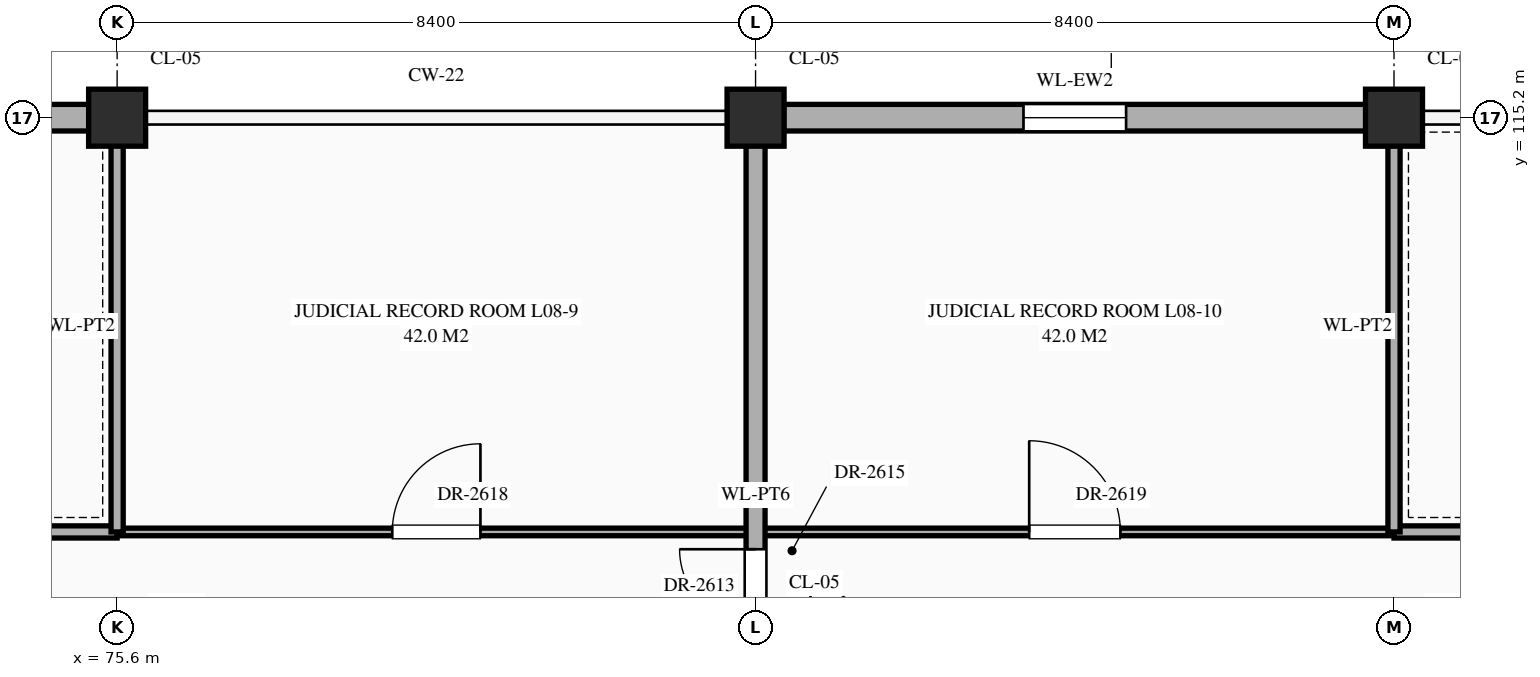
"""IFC4 building model, lengths in metres.
Left out: names, types, materials, properties, quantities, classifications, styles, units other than length and angle.
Written with IfcOpenShell. Run it as: python <this file> out.ifc"""

import sys

from ifc_helpers import new_model, si_unit, direction, frame, frame_2d, origin, origin_2d, place, context, subcontext, project, spatial, rectangle, extrude, element, fill, save


model = new_model("IFC4")
c1 = context("Model", 3, precision=1e-05, world=origin(), true_north=direction((0.0, 1.0)))
c2 = subcontext(c1, "Body", "Model", "MODEL_VIEW")
j1 = project(units=[si_unit("LENGTHUNIT", "METRE"), si_unit("PLANEANGLEUNIT", "RADIAN")], contexts=[c1])
p1 = place(None, origin())
s1 = spatial("IfcSite", under=j1, at=p1, CompositionType="ELEMENT")
p2 = place(p1, origin())
s2 = spatial("IfcBuilding", under=s1, at=p2, CompositionType="ELEMENT")
p3 = place(p2, frame((0.0, 0.0, 35.1)))
s3 = spatial("IfcBuildingStorey", under=s2, at=p3, CompositionType="ELEMENT", Elevation=35.1)
for number, where, z_axis, x_axis in (
    (1, (75.6, 115.2, 0.0), (0.0, 0.0, 1.0), (1.0, 0.0, 0.0)),
    (2, (84.0, 115.2, 0.0), (0.0, 0.0, 1.0), (1.0, 0.0, 0.0)),
    (3, (92.4, 115.2, 0.0), (0.0, 0.0, 1.0), (1.0, 0.0, 0.0)),
):
    element("IfcColumn", number, at=place(p3, frame(where, z_axis=z_axis, x_axis=x_axis)), inside=s3, PredefinedType="COLUMN", context=c2, shape_type="SweptSolid", body=[
        extrude(rectangle(XDim=0.75, YDim=0.75, at=origin_2d()), origin(), (0.0, 0.0, 1.0), 4.2),
    ])
p4 = place(p3, frame((67.57, 115.2, 0.0), z_axis=(0.0, 0.0, 1.0), x_axis=(1.0, 0.0, 0.0)))
e4 = element("IfcWall", 4, at=p4, inside=s3, PredefinedType="STANDARD", context=c2, shape_type="SweptSolid", body=[
    extrude(rectangle(XDim=7.66, YDim=0.35, at=frame_2d((3.83, 0.0))), origin(), (0.0, 0.0, 1.0), 3.3),
])
p5 = place(p4, frame((3.155, 0.0, 0.85)))
e5 = element("IfcOpeningElement", 5, at=p5, cuts=e4, PredefinedType="OPENING", context=c2, shape_type="SweptSolid", body=[
    extrude(rectangle(XDim=1.35, YDim=1.38, at=frame_2d((0.675, 0.69))), frame((0.0, 0.187, 0.0), z_axis=(0.0, -1.0, 0.0), x_axis=(1.0, 0.0, 0.0)), (0.0, 0.0, 1.0), 0.374),
])
p6 = place(p3, frame((84.37, 115.2, 0.0), z_axis=(0.0, 0.0, 1.0), x_axis=(1.0, 0.0, 0.0)))
e6 = element("IfcWall", 6, at=p6, inside=s3, PredefinedType="STANDARD", context=c2, shape_type="SweptSolid", body=[
    extrude(rectangle(XDim=7.66, YDim=0.35, at=frame_2d((3.83, 0.0))), origin(), (0.0, 0.0, 1.0), 3.3),
])
p7 = place(p6, frame((3.155, 0.0, 0.85)))
e7 = element("IfcOpeningElement", 7, at=p7, cuts=e6, PredefinedType="OPENING", context=c2, shape_type="SweptSolid", body=[
    extrude(rectangle(XDim=1.35, YDim=1.74, at=frame_2d((0.675, 0.87))), frame((0.0, 0.187, 0.0), z_axis=(0.0, -1.0, 0.0), x_axis=(1.0, 0.0, 0.0)), (0.0, 0.0, 1.0), 0.374),
])
p8 = place(p3, frame((58.8, 109.75, 0.0), z_axis=(0.0, 0.0, 1.0), x_axis=(1.0, 0.0, 0.0)))
e8 = element("IfcWall", 8, at=p8, inside=s3, PredefinedType="STANDARD", context=c2, shape_type="SweptSolid", body=[
    extrude(rectangle(XDim=16.8, YDim=0.16, at=frame_2d((8.4, 0.0))), origin(), (0.0, 0.0, 1.0), 3.95),
])
p9 = place(p8, frame((7.55, 0.0, 0.0)))
e9 = element("IfcOpeningElement", 9, at=p9, cuts=e8, PredefinedType="OPENING", context=c2, shape_type="SweptSolid", body=[
    extrude(rectangle(XDim=1.7, YDim=2.45, at=frame_2d((0.85, 1.225))), frame((0.0, 0.092, 0.0), z_axis=(0.0, -1.0, 0.0), x_axis=(1.0, 0.0, 0.0)), (0.0, 0.0, 1.0), 0.184),
])
p10 = place(p3, frame((75.6, 109.75, 0.0), z_axis=(0.0, 0.0, 1.0), x_axis=(1.0, 0.0, 0.0)))
e10 = element("IfcWall", 10, at=p10, inside=s3, PredefinedType="STANDARD", context=c2, shape_type="SweptSolid", body=[
    extrude(rectangle(XDim=16.8, YDim=0.1, at=frame_2d((8.4, 0.0))), origin(), (0.0, 0.0, 1.0), 3.95),
])
p11 = place(p10, frame((3.62, 0.0, 0.0)))
e11 = element("IfcOpeningElement", 11, at=p11, cuts=e10, PredefinedType="OPENING", context=c2, shape_type="SweptSolid", body=[
    extrude(rectangle(XDim=1.16, YDim=2.3, at=frame_2d((0.58, 1.15))), frame((0.0, 0.062, 0.0), z_axis=(0.0, -1.0, 0.0), x_axis=(1.0, 0.0, 0.0)), (0.0, 0.0, 1.0), 0.124),
])
p12 = place(p10, frame((12.0, 0.0, 0.0)))
e12 = element("IfcOpeningElement", 12, at=p12, cuts=e10, PredefinedType="OPENING", context=c2, shape_type="SweptSolid", body=[
    extrude(rectangle(XDim=1.2, YDim=2.35, at=frame_2d((0.6, 1.175))), frame((0.0, 0.062, 0.0), z_axis=(0.0, -1.0, 0.0), x_axis=(1.0, 0.0, 0.0)), (0.0, 0.0, 1.0), 0.124),
])
p13 = place(p3, frame((92.4, 109.75, 0.0), z_axis=(0.0, 0.0, 1.0), x_axis=(1.0, 0.0, 0.0)))
e13 = element("IfcWall", 13, at=p13, inside=s3, PredefinedType="STANDARD", context=c2, shape_type="SweptSolid", body=[
    extrude(rectangle(XDim=16.8, YDim=0.16, at=frame_2d((8.4, 0.0))), origin(), (0.0, 0.0, 1.0), 3.95),
])
p14 = place(p13, frame((7.5, 0.0, 0.0)))
e14 = element("IfcOpeningElement", 14, at=p14, cuts=e13, PredefinedType="OPENING", context=c2, shape_type="SweptSolid", body=[
    extrude(rectangle(XDim=1.8, YDim=2.5, at=frame_2d((0.9, 1.25))), frame((0.0, 0.092, 0.0), z_axis=(0.0, -1.0, 0.0), x_axis=(1.0, 0.0, 0.0)), (0.0, 0.0, 1.0), 0.184),
])
p15 = place(p3, frame((75.6, 109.75, 0.0), z_axis=(0.0, 0.0, 1.0), x_axis=(0.0, 1.0, 0.0)))
e15 = element("IfcWall", 15, at=p15, inside=s3, PredefinedType="STANDARD", context=c2, shape_type="SweptSolid", body=[
    extrude(rectangle(XDim=5.41, YDim=0.16, at=frame_2d((2.705, 0.0))), origin(), (0.0, 0.0, 1.0), 3.2),
])
p16 = place(p3, frame((84.0, 84.65, 0.0), z_axis=(0.0, 0.0, 1.0), x_axis=(0.0, 1.0, 0.0)))
e16 = element("IfcWall", 16, at=p16, inside=s3, PredefinedType="STANDARD", context=c2, shape_type="SweptSolid", body=[
    extrude(rectangle(XDim=30.51, YDim=0.25, at=frame_2d((15.255, 0.0))), origin(), (0.0, 0.0, 1.0), 3.2),
])
p17 = place(p16, frame((17.097, 0.0, 0.0)))
e17 = element("IfcOpeningElement", 17, at=p17, cuts=e16, PredefinedType="OPENING", context=c2, shape_type="SweptSolid", body=[
    extrude(rectangle(XDim=2.0, YDim=2.4, at=frame_2d((1.0, 1.2))), frame((0.0, 0.137, 0.0), z_axis=(0.0, -1.0, 0.0), x_axis=(1.0, 0.0, 0.0)), (0.0, 0.0, 1.0), 0.274),
])
p18 = place(p16, frame((7.127, 0.0, 0.0)))
e18 = element("IfcOpeningElement", 18, at=p18, cuts=e16, PredefinedType="OPENING", context=c2, shape_type="SweptSolid", body=[
    extrude(rectangle(XDim=0.95, YDim=2.15, at=frame_2d((0.475, 1.075))), frame((0.0, 0.137, 0.0), z_axis=(0.0, -1.0, 0.0), x_axis=(1.0, 0.0, 0.0)), (0.0, 0.0, 1.0), 0.274),
])
p19 = place(p16, frame((9.823, 0.0, 0.0)))
e19 = element("IfcOpeningElement", 19, at=p19, cuts=e16, PredefinedType="OPENING", context=c2, shape_type="SweptSolid", body=[
    extrude(rectangle(XDim=0.95, YDim=2.15, at=frame_2d((0.475, 1.075))), frame((0.0, 0.137, 0.0), z_axis=(0.0, -1.0, 0.0), x_axis=(1.0, 0.0, 0.0)), (0.0, 0.0, 1.0), 0.274),
])
p20 = place(p16, frame((20.603, 0.0, 0.0)))
e20 = element("IfcOpeningElement", 20, at=p20, cuts=e16, PredefinedType="OPENING", context=c2, shape_type="SweptSolid", body=[
    extrude(rectangle(XDim=1.6, YDim=2.3, at=frame_2d((0.8, 1.15))), frame((0.0, 0.137, 0.0), z_axis=(0.0, -1.0, 0.0), x_axis=(1.0, 0.0, 0.0)), (0.0, 0.0, 1.0), 0.274),
])
p21 = place(p16, frame((23.873, 0.0, 0.0)))
e21 = element("IfcOpeningElement", 21, at=p21, cuts=e16, PredefinedType="OPENING", context=c2, shape_type="SweptSolid", body=[
    extrude(rectangle(XDim=1.0, YDim=2.2, at=frame_2d((0.5, 1.1))), frame((0.0, 0.137, 0.0), z_axis=(0.0, -1.0, 0.0), x_axis=(1.0, 0.0, 0.0)), (0.0, 0.0, 1.0), 0.274),
])
p22 = place(p16, frame((0.228, 0.0, 0.0)))
e22 = element("IfcOpeningElement", 22, at=p22, cuts=e16, PredefinedType="OPENING", context=c2, shape_type="SweptSolid", body=[
    extrude(rectangle(XDim=1.0, YDim=2.2, at=frame_2d((0.5, 1.1))), frame((0.0, 0.137, 0.0), z_axis=(0.0, -1.0, 0.0), x_axis=(1.0, 0.0, 0.0)), (0.0, 0.0, 1.0), 0.274),
])
p23 = place(p3, frame((92.4, 109.75, 0.0), z_axis=(0.0, 0.0, 1.0), x_axis=(0.0, 1.0, 0.0)))
e23 = element("IfcWall", 23, at=p23, inside=s3, PredefinedType="STANDARD", context=c2, shape_type="SweptSolid", body=[
    extrude(rectangle(XDim=5.41, YDim=0.16, at=frame_2d((2.705, 0.0))), origin(), (0.0, 0.0, 1.0), 3.2),
])
p24 = place(p7, origin())
e24 = element("IfcWindow", 24, at=p24, inside=s3, PartitioningType="SINGLE_PANEL", PredefinedType="WINDOW", context=c2, shape_type="SweptSolid", body=[
    extrude(rectangle(XDim=1.35, YDim=1.74, at=frame_2d((0.675, 0.87))), frame((0.0, 0.03, 0.0), z_axis=(0.0, -1.0, 0.0), x_axis=(1.0, 0.0, 0.0)), (0.0, 0.0, 1.0), 0.06),
])
fill(e7, e24)
p25 = place(p21, origin())
e25 = element("IfcDoor", 25, at=p25, inside=s3, OperationType="SINGLE_SWING_RIGHT", PredefinedType="DOOR", context=c2, shape_type="SweptSolid", body=[
    extrude(rectangle(XDim=1.0, YDim=2.2, at=frame_2d((0.5, 1.1))), frame((0.0, 0.025, 0.0), z_axis=(0.0, -1.0, 0.0), x_axis=(1.0, 0.0, 0.0)), (0.0, 0.0, 1.0), 0.05),
])
fill(e21, e25)
p26 = place(p11, origin())
e26 = element("IfcDoor", 26, at=p26, inside=s3, OperationType="SINGLE_SWING_RIGHT", PredefinedType="DOOR", context=c2, shape_type="SweptSolid", body=[
    extrude(rectangle(XDim=1.16, YDim=2.3, at=frame_2d((0.58, 1.15))), frame((0.0, 0.025, 0.0), z_axis=(0.0, -1.0, 0.0), x_axis=(1.0, 0.0, 0.0)), (0.0, 0.0, 1.0), 0.05),
])
fill(e11, e26)
p27 = place(p12, origin())
e27 = element("IfcDoor", 27, at=p27, inside=s3, OperationType="SINGLE_SWING_LEFT", PredefinedType="DOOR", context=c2, shape_type="SweptSolid", body=[
    extrude(rectangle(XDim=1.2, YDim=2.35, at=frame_2d((0.6, 1.175))), frame((0.0, 0.025, 0.0), z_axis=(0.0, -1.0, 0.0), x_axis=(1.0, 0.0, 0.0)), (0.0, 0.0, 1.0), 0.05),
])
fill(e12, e27)
save(model, sys.argv[1])
